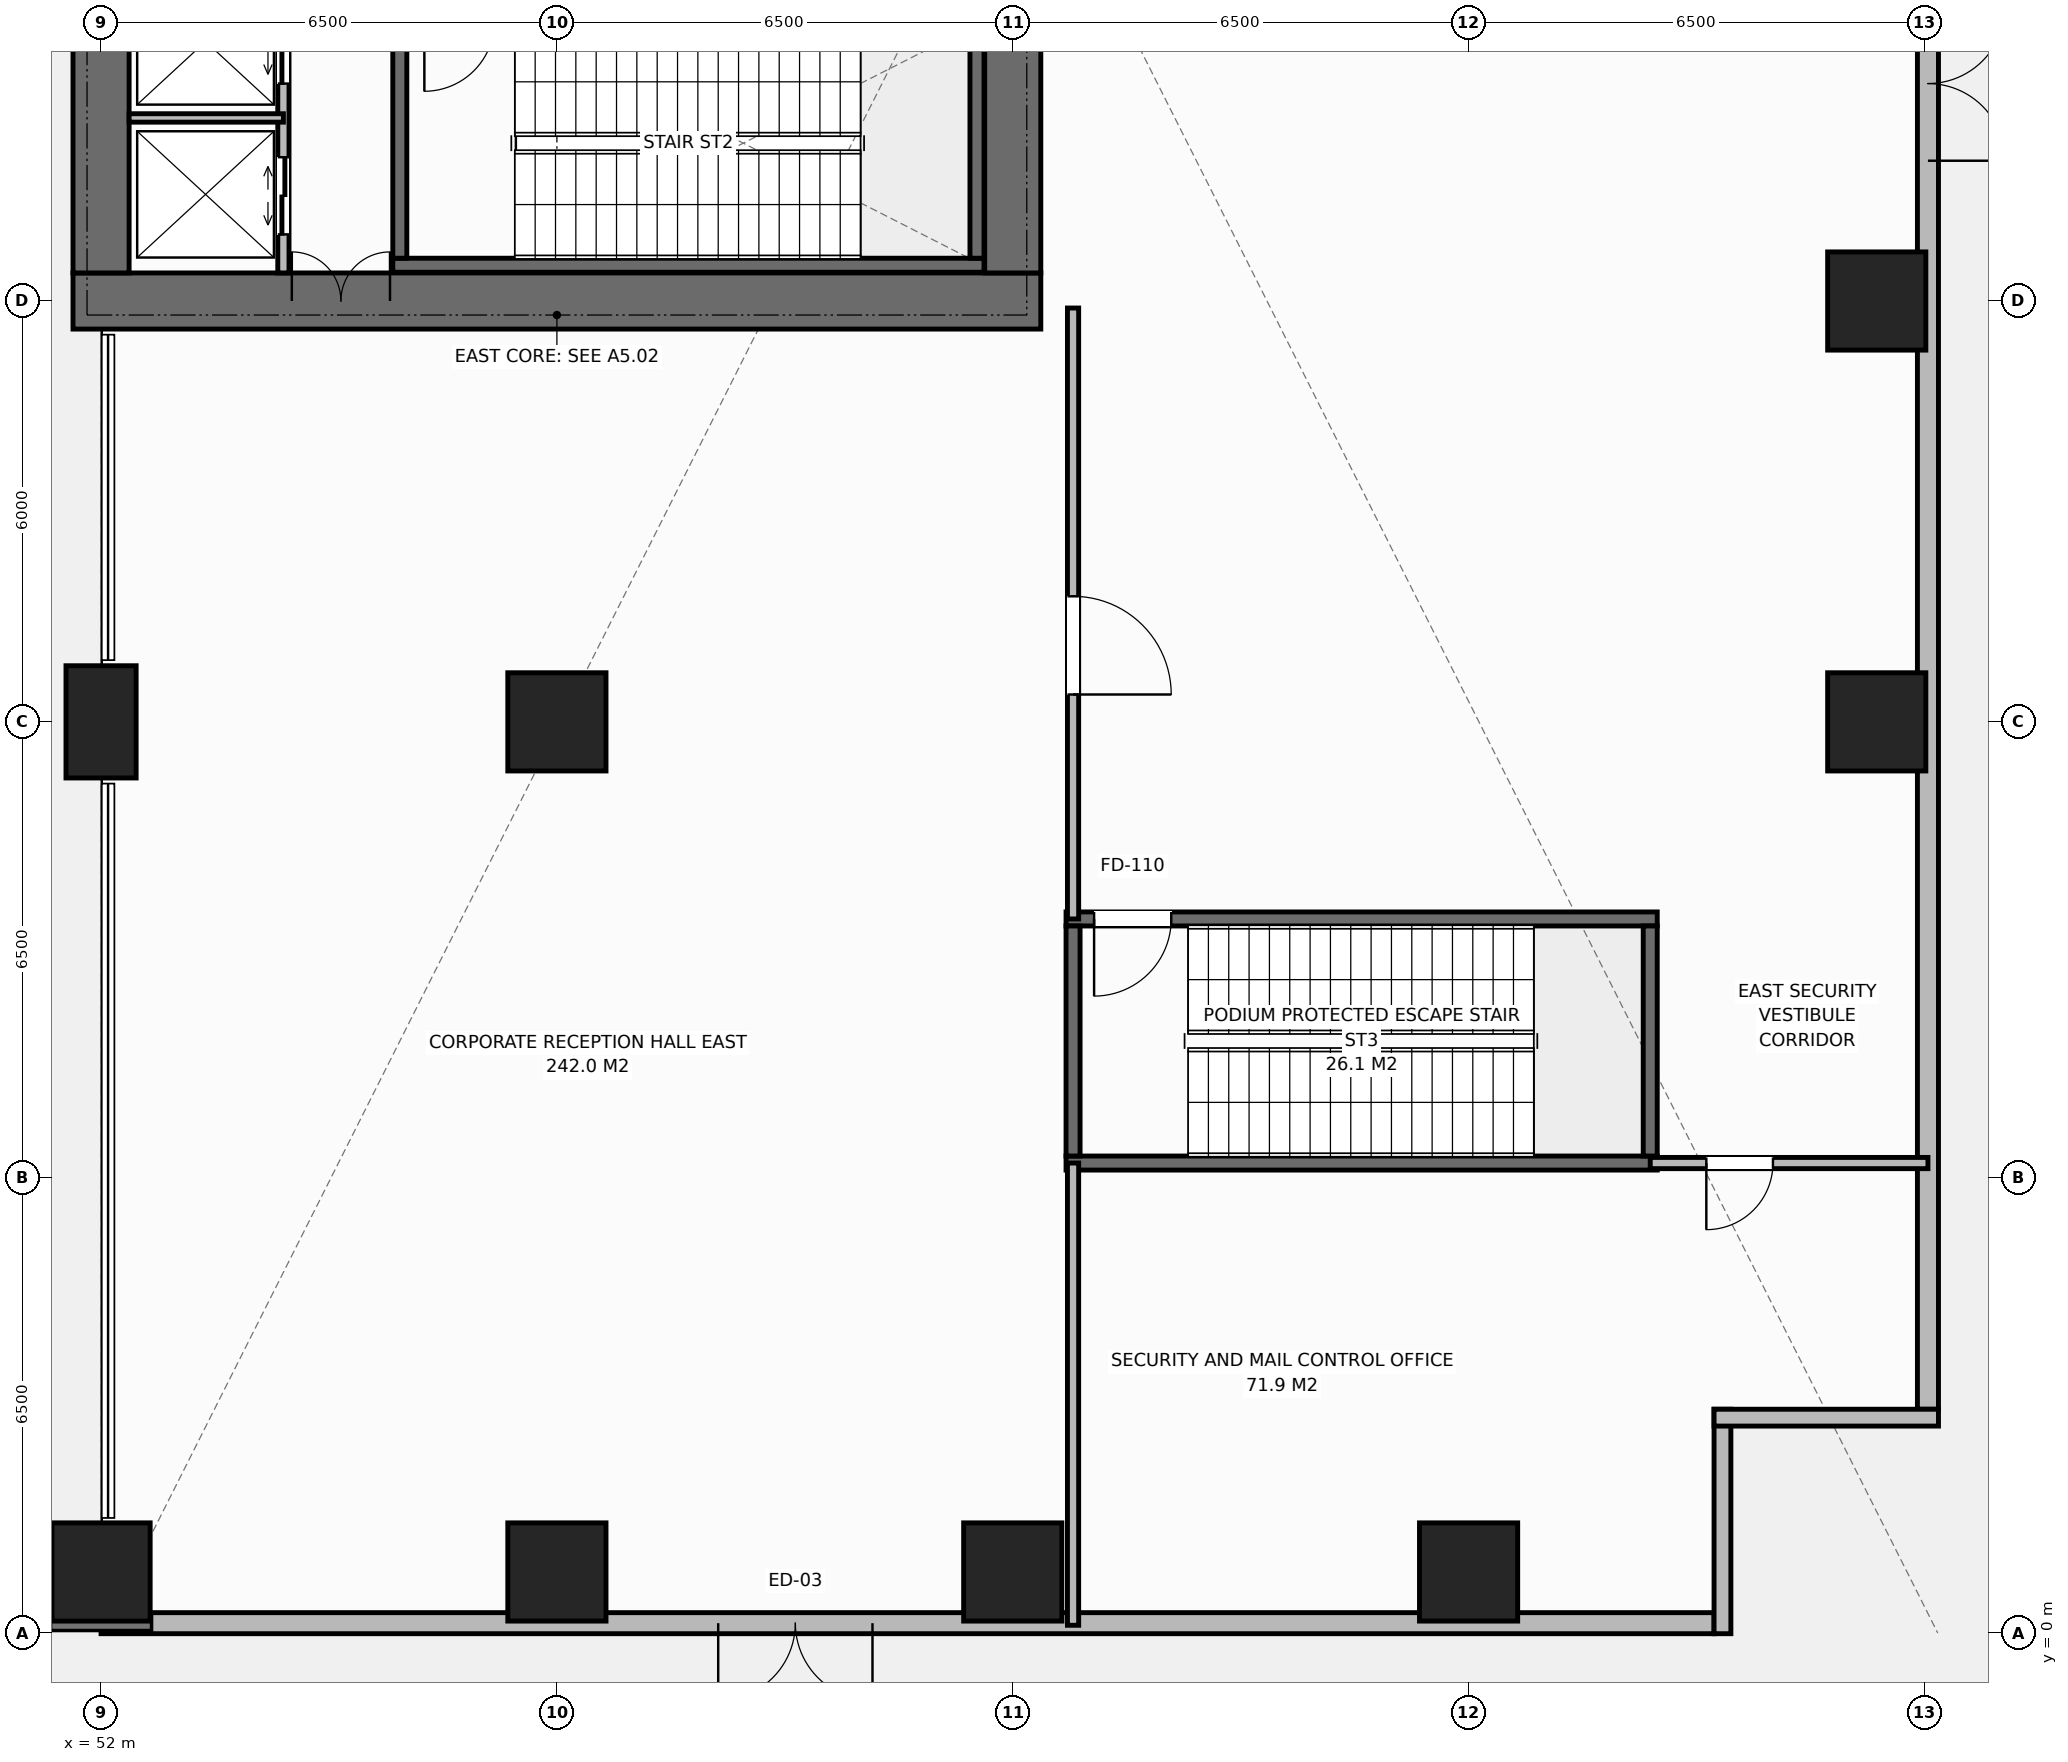
"""IFC4 building model, lengths in metres.
Left out: names, types, materials, properties, quantities, classifications, styles, units other than length and angle.
Written with IfcOpenShell. Run it as: python <this file> out.ifc"""

import sys

from ifc_helpers import new_model, si_unit, direction, frame, frame_2d, origin, origin_2d, place, context, subcontext, project, spatial, rectangle, extrude, element, fill, save


model = new_model("IFC4")
c1 = context("Model", 3, precision=1e-05, world=origin(), true_north=direction((0.0, 1.0)))
c2 = subcontext(c1, "Body", "Model", "MODEL_VIEW")
j1 = project(units=[si_unit("LENGTHUNIT", "METRE"), si_unit("PLANEANGLEUNIT", "RADIAN")], contexts=[c1])
p1 = place(None, origin())
s1 = spatial("IfcSite", under=j1, at=p1, CompositionType="ELEMENT")
p2 = place(p1, origin())
s2 = spatial("IfcBuilding", under=s1, at=p2, CompositionType="ELEMENT")
p3 = place(p2, origin())
s3 = spatial("IfcBuildingStorey", under=s2, at=p3, CompositionType="ELEMENT", Elevation=0.0)
p4 = place(p3, frame((51.6, 19.0, 0.0), z_axis=(0.0, 0.0, 1.0), x_axis=(1.0, 0.0, 0.0)))
e1 = element("IfcWall", 1, at=p4, inside=s3, PredefinedType="SHEAR", context=c2, shape_type="SweptSolid", body=[
    extrude(rectangle(XDim=13.8, YDim=0.8, at=frame_2d((6.9, 0.0))), origin(), (0.0, 0.0, 1.0), 6.0),
])
p5 = place(p4, frame((3.12, 0.0, 0.0)))
e2 = element("IfcOpeningElement", 2, at=p5, cuts=e1, PredefinedType="OPENING", context=c2, shape_type="SweptSolid", body=[
    extrude(rectangle(XDim=1.4, YDim=2.2, at=frame_2d((0.7, 1.1))), frame((0.0, 0.41, 0.0), z_axis=(0.0, -1.0, 0.0), x_axis=(1.0, 0.0, 0.0)), (0.0, 0.0, 1.0), 0.82),
])
p6 = place(p3, frame((52.0, 19.4, 0.0), z_axis=(0.0, 0.0, 1.0), x_axis=(0.0, 1.0, 0.0)))
e3 = element("IfcWall", 3, at=p6, inside=s3, PredefinedType="SHEAR", context=c2, shape_type="SweptSolid", body=[
    extrude(rectangle(XDim=13.2, YDim=0.8, at=frame_2d((6.6, 0.0))), origin(), (0.0, 0.0, 1.0), 6.0),
])
p7 = place(p3, frame((65.0, 19.4, 0.0), z_axis=(0.0, 0.0, 1.0), x_axis=(0.0, 1.0, 0.0)))
e4 = element("IfcWall", 4, at=p7, inside=s3, PredefinedType="SHEAR", context=c2, shape_type="SweptSolid", body=[
    extrude(rectangle(XDim=13.2, YDim=0.8, at=frame_2d((6.6, 0.0))), origin(), (0.0, 0.0, 1.0), 6.0),
])
p8 = place(p7, frame((8.05, 0.0, 0.0)))
e5 = element("IfcOpeningElement", 5, at=p8, cuts=e4, PredefinedType="OPENING", context=c2, shape_type="SweptSolid", body=[
    extrude(rectangle(XDim=1.3, YDim=2.2, at=frame_2d((0.65, 1.1))), frame((0.0, 0.41, 0.0), z_axis=(0.0, -1.0, 0.0), x_axis=(1.0, 0.0, 0.0)), (0.0, 0.0, 1.0), 0.82),
])
p9 = place(p3, frame((56.16, 19.51, 0.0), z_axis=(0.0, 0.0, 1.0), x_axis=(1.0, 0.0, 0.0)))
e6 = element("IfcWall", 6, at=p9, inside=s3, PredefinedType="SHEAR", context=c2, shape_type="SweptSolid", body=[
    extrude(rectangle(XDim=8.43, YDim=0.2, at=frame_2d((4.215, 0.0))), origin(), (0.0, 0.0, 1.0), 6.0),
])
for number, where, z_axis, x_axis in (
    (7, (56.26, 19.61, 0.0), (0.0, 0.0, 1.0), (0.0, 1.0, 0.0)),
    (8, (64.49, 19.61, 0.0), (0.0, 0.0, 1.0), (0.0, 1.0, 0.0)),
):
    element("IfcWall", number, at=place(p3, frame(where, z_axis=z_axis, x_axis=x_axis)), inside=s3, PredefinedType="SHEAR", context=c2, shape_type="SweptSolid", body=[
        extrude(rectangle(XDim=3.28, YDim=0.2, at=frame_2d((1.64, 0.0))), origin(), (0.0, 0.0, 1.0), 6.0),
    ])
p10 = place(p3, frame((65.76, 6.71, 0.0), z_axis=(0.0, 0.0, 1.0), x_axis=(1.0, 0.0, 0.0)))
e9 = element("IfcWall", 9, at=p10, inside=s3, PredefinedType="SHEAR", context=c2, shape_type="SweptSolid", body=[
    extrude(rectangle(XDim=8.43, YDim=0.2, at=frame_2d((4.215, 0.0))), origin(), (0.0, 0.0, 1.0), 6.0),
])
p11 = place(p3, frame((65.76, 10.19, 0.0), z_axis=(0.0, 0.0, 1.0), x_axis=(1.0, 0.0, 0.0)))
e10 = element("IfcWall", 10, at=p11, inside=s3, PredefinedType="SHEAR", context=c2, shape_type="SweptSolid", body=[
    extrude(rectangle(XDim=8.43, YDim=0.2, at=frame_2d((4.215, 0.0))), origin(), (0.0, 0.0, 1.0), 6.0),
])
p12 = place(p11, frame((0.4, 0.0, 0.0)))
e11 = element("IfcOpeningElement", 11, at=p12, cuts=e10, PredefinedType="OPENING", context=c2, shape_type="SweptSolid", body=[
    extrude(rectangle(XDim=1.1, YDim=2.15, at=frame_2d((0.55, 1.075))), frame((0.0, 0.11, 0.0), z_axis=(0.0, -1.0, 0.0), x_axis=(1.0, 0.0, 0.0)), (0.0, 0.0, 1.0), 0.22),
])
for number, where, z_axis, x_axis in (
    (12, (65.86, 6.81, 0.0), (0.0, 0.0, 1.0), (0.0, 1.0, 0.0)),
    (13, (74.09, 6.81, 0.0), (0.0, 0.0, 1.0), (0.0, 1.0, 0.0)),
):
    element("IfcWall", number, at=place(p3, frame(where, z_axis=z_axis, x_axis=x_axis)), inside=s3, PredefinedType="SHEAR", context=c2, shape_type="SweptSolid", body=[
        extrude(rectangle(XDim=3.28, YDim=0.2, at=frame_2d((1.64, 0.0))), origin(), (0.0, 0.0, 1.0), 6.0),
    ])
p13 = place(p3, frame((58.5, 13.0, 0.0), z_axis=(0.0, 0.0, 1.0), x_axis=(1.0, 0.0, 0.0)))
e14 = element("IfcColumn", 14, at=p13, inside=s3, PredefinedType="COLUMN", context=c2, shape_type="SweptSolid", body=[
    extrude(rectangle(XDim=1.4, YDim=1.4, at=origin_2d()), origin(), (0.0, 0.0, 1.0), 6.0),
])
p14 = place(p3, frame((52.0, 13.0, 0.0), z_axis=(0.0, 0.0, 1.0), x_axis=(1.0, 0.0, 0.0)))
e15 = element("IfcColumn", 15, at=p14, inside=s3, PredefinedType="PILASTER", context=c2, shape_type="SweptSolid", body=[
    extrude(rectangle(XDim=1.0, YDim=1.6, at=origin_2d()), origin(), (0.0, 0.0, 1.0), 6.0),
])
for number, where, z_axis, x_axis in (
    (16, (52.0, 0.88, 0.0), (0.0, 0.0, 1.0), (1.0, 0.0, 0.0)),
    (17, (58.5, 0.88, 0.0), (0.0, 0.0, 1.0), (1.0, 0.0, 0.0)),
    (18, (65.0, 0.88, 0.0), (0.0, 0.0, 1.0), (1.0, 0.0, 0.0)),
    (19, (71.5, 0.88, 0.0), (0.0, 0.0, 1.0), (1.0, 0.0, 0.0)),
    (20, (77.32, 13.0, 0.0), (0.0, 0.0, 1.0), (1.0, 0.0, 0.0)),
    (21, (77.32, 19.0, 0.0), (0.0, 0.0, 1.0), (1.0, 0.0, 0.0)),
):
    element("IfcColumn", number, at=place(p3, frame(where, z_axis=z_axis, x_axis=x_axis)), inside=s3, PredefinedType="COLUMN", context=c2, shape_type="SweptSolid", body=[
        extrude(rectangle(XDim=1.4, YDim=1.4, at=origin_2d()), origin(), (0.0, 0.0, 1.0), 6.0),
    ])
p15 = place(p3, frame((75.0, 0.15, 0.0), z_axis=(0.0, 0.0, 1.0), x_axis=(-1.0, 0.0, 0.0)))
e22 = element("IfcWall", 22, at=p15, inside=s3, PredefinedType="STANDARD", context=c2, shape_type="SweptSolid", body=[
    extrude(rectangle(XDim=23.0, YDim=0.3, at=frame_2d((11.5, 0.0))), origin(), (0.0, 0.0, 1.0), 5.72),
])
p16 = place(p15, frame((12.0, 0.0, 0.0)))
e23 = element("IfcOpeningElement", 23, at=p16, cuts=e22, PredefinedType="OPENING", context=c2, shape_type="SweptSolid", body=[
    extrude(rectangle(XDim=2.2, YDim=2.4, at=frame_2d((1.1, 1.2))), frame((0.0, 0.16, 0.0), z_axis=(0.0, -1.0, 0.0), x_axis=(1.0, 0.0, 0.0)), (0.0, 0.0, 1.0), 0.32),
])
p17 = place(p3, frame((78.05, 48.8, 0.0), z_axis=(0.0, 0.0, 1.0), x_axis=(0.0, -1.0, 0.0)))
e24 = element("IfcWall", 24, at=p17, inside=s3, PredefinedType="STANDARD", context=c2, shape_type="SweptSolid", body=[
    extrude(rectangle(XDim=45.6, YDim=0.3, at=frame_2d((22.8, 0.0))), origin(), (0.0, 0.0, 1.0), 5.72),
])
p18 = place(p17, frame((2.6, 0.0, 0.0)))
e25 = element("IfcOpeningElement", 25, at=p18, cuts=e24, PredefinedType="OPENING", context=c2, shape_type="SweptSolid", body=[
    extrude(rectangle(XDim=6.0, YDim=3.2, at=frame_2d((3.0, 1.6))), frame((0.0, 0.16, 0.0), z_axis=(0.0, -1.0, 0.0), x_axis=(1.0, 0.0, 0.0)), (0.0, 0.0, 1.0), 0.32),
])
p19 = place(p17, frame((25.6, 0.0, 0.0)))
e26 = element("IfcOpeningElement", 26, at=p19, cuts=e24, PredefinedType="OPENING", context=c2, shape_type="SweptSolid", body=[
    extrude(rectangle(XDim=2.2, YDim=2.4, at=frame_2d((1.1, 1.2))), frame((0.0, 0.16, 0.0), z_axis=(0.0, -1.0, 0.0), x_axis=(1.0, 0.0, 0.0)), (0.0, 0.0, 1.0), 0.32),
])
for number, where, z_axis, x_axis in (
    (27, (75.12, 3.2, 0.0), (0.0, 0.0, 1.0), (0.0, -1.0, 0.0)),
    (28, (78.2, 3.08, 0.0), (0.0, 0.0, 1.0), (-1.0, 0.0, 0.0)),
):
    element("IfcWall", number, at=place(p3, frame(where, z_axis=z_axis, x_axis=x_axis)), inside=s3, PredefinedType="STANDARD", context=c2, shape_type="SweptSolid", body=[
        extrude(rectangle(XDim=3.2, YDim=0.24, at=frame_2d((1.6, 0.0))), origin(), (0.0, 0.0, 1.0), 5.72),
    ])
p20 = place(p3, frame((54.6, 19.4, 0.0), z_axis=(0.0, 0.0, 1.0), x_axis=(0.0, 1.0, 0.0)))
e29 = element("IfcWall", 29, at=p20, inside=s3, PredefinedType="STANDARD", context=c2, shape_type="SweptSolid", body=[
    extrude(rectangle(XDim=13.2, YDim=0.16, at=frame_2d((6.6, 0.0))), origin(), (0.0, 0.0, 1.0), 5.72),
])
p21 = place(p20, frame((0.55, 0.0, 0.0)))
e30 = element("IfcOpeningElement", 30, at=p21, cuts=e29, PredefinedType="OPENING", context=c2, shape_type="SweptSolid", body=[
    extrude(rectangle(XDim=1.1, YDim=2.2, at=frame_2d((0.55, 1.1))), frame((0.0, 0.09, 0.0), z_axis=(0.0, -1.0, 0.0), x_axis=(1.0, 0.0, 0.0)), (0.0, 0.0, 1.0), 0.18),
])
p22 = place(p20, frame((2.7, 0.0, 0.0)))
e31 = element("IfcOpeningElement", 31, at=p22, cuts=e29, PredefinedType="OPENING", context=c2, shape_type="SweptSolid", body=[
    extrude(rectangle(XDim=1.1, YDim=2.2, at=frame_2d((0.55, 1.1))), frame((0.0, 0.09, 0.0), z_axis=(0.0, -1.0, 0.0), x_axis=(1.0, 0.0, 0.0)), (0.0, 0.0, 1.0), 0.18),
])
p23 = place(p20, frame((4.9, 0.0, 0.0)))
e32 = element("IfcOpeningElement", 32, at=p23, cuts=e29, PredefinedType="OPENING", context=c2, shape_type="SweptSolid", body=[
    extrude(rectangle(XDim=1.1, YDim=2.2, at=frame_2d((0.55, 1.1))), frame((0.0, 0.09, 0.0), z_axis=(0.0, -1.0, 0.0), x_axis=(1.0, 0.0, 0.0)), (0.0, 0.0, 1.0), 0.18),
])
p24 = place(p20, frame((7.05, 0.0, 0.0)))
e33 = element("IfcOpeningElement", 33, at=p24, cuts=e29, PredefinedType="OPENING", context=c2, shape_type="SweptSolid", body=[
    extrude(rectangle(XDim=1.1, YDim=2.2, at=frame_2d((0.55, 1.1))), frame((0.0, 0.09, 0.0), z_axis=(0.0, -1.0, 0.0), x_axis=(1.0, 0.0, 0.0)), (0.0, 0.0, 1.0), 0.18),
])
p25 = place(p20, frame((9.2, 0.0, 0.0)))
e34 = element("IfcOpeningElement", 34, at=p25, cuts=e29, PredefinedType="OPENING", context=c2, shape_type="SweptSolid", body=[
    extrude(rectangle(XDim=1.1, YDim=2.2, at=frame_2d((0.55, 1.1))), frame((0.0, 0.09, 0.0), z_axis=(0.0, -1.0, 0.0), x_axis=(1.0, 0.0, 0.0)), (0.0, 0.0, 1.0), 0.18),
])
p26 = place(p20, frame((11.4, 0.0, 0.0)))
e35 = element("IfcOpeningElement", 35, at=p26, cuts=e29, PredefinedType="OPENING", context=c2, shape_type="SweptSolid", body=[
    extrude(rectangle(XDim=1.1, YDim=2.2, at=frame_2d((0.55, 1.1))), frame((0.0, 0.09, 0.0), z_axis=(0.0, -1.0, 0.0), x_axis=(1.0, 0.0, 0.0)), (0.0, 0.0, 1.0), 0.18),
])
p27 = place(p3, frame((52.4, 21.61, 0.0), z_axis=(0.0, 0.0, 1.0), x_axis=(1.0, 0.0, 0.0)))
e36 = element("IfcWall", 36, at=p27, inside=s3, PredefinedType="PARTITIONING", context=c2, shape_type="SweptSolid", body=[
    extrude(rectangle(XDim=2.2, YDim=0.12, at=frame_2d((1.1, 0.0))), origin(), (0.0, 0.0, 1.0), 5.72),
])
p28 = place(p3, frame((65.86, 0.12, 0.0), z_axis=(0.0, 0.0, 1.0), x_axis=(0.0, 1.0, 0.0)))
e37 = element("IfcWall", 37, at=p28, inside=s3, PredefinedType="STANDARD", context=c2, shape_type="SweptSolid", body=[
    extrude(rectangle(XDim=6.59, YDim=0.16, at=frame_2d((3.295, 0.0))), origin(), (0.0, 0.0, 1.0), 5.72),
])
p29 = place(p3, frame((74.09, 6.71, 0.0), z_axis=(0.0, 0.0, 1.0), x_axis=(1.0, 0.0, 0.0)))
e38 = element("IfcWall", 38, at=p29, inside=s3, PredefinedType="STANDARD", context=c2, shape_type="SweptSolid", body=[
    extrude(rectangle(XDim=3.96, YDim=0.16, at=frame_2d((1.98, 0.0))), origin(), (0.0, 0.0, 1.0), 5.72),
])
p30 = place(p29, frame((0.8, 0.0, 0.0)))
e39 = element("IfcOpeningElement", 39, at=p30, cuts=e38, PredefinedType="OPENING", context=c2, shape_type="SweptSolid", body=[
    extrude(rectangle(XDim=0.95, YDim=2.15, at=frame_2d((0.475, 1.075))), frame((0.0, 0.09, 0.0), z_axis=(0.0, -1.0, 0.0), x_axis=(1.0, 0.0, 0.0)), (0.0, 0.0, 1.0), 0.18),
])
p31 = place(p3, frame((65.86, 10.19, 0.0), z_axis=(0.0, 0.0, 1.0), x_axis=(0.0, 1.0, 0.0)))
e40 = element("IfcWall", 40, at=p31, inside=s3, PredefinedType="STANDARD", context=c2, shape_type="SweptSolid", body=[
    extrude(rectangle(XDim=8.71, YDim=0.16, at=frame_2d((4.355, 0.0))), origin(), (0.0, 0.0, 1.0), 5.72),
])
p32 = place(p31, frame((3.2, 0.0, 0.0)))
e41 = element("IfcOpeningElement", 41, at=p32, cuts=e40, PredefinedType="OPENING", context=c2, shape_type="SweptSolid", body=[
    extrude(rectangle(XDim=1.4, YDim=2.2, at=frame_2d((0.7, 1.1))), frame((0.0, 0.09, 0.0), z_axis=(0.0, -1.0, 0.0), x_axis=(1.0, 0.0, 0.0)), (0.0, 0.0, 1.0), 0.18),
])
p33 = place(p16, origin())
e42 = element("IfcDoor", 42, at=p33, inside=s3, OperationType="DOUBLE_DOOR_SINGLE_SWING", PredefinedType="DOOR", context=c2, shape_type="SweptSolid", body=[
    extrude(rectangle(XDim=2.2, YDim=2.4, at=frame_2d((1.1, 1.2))), frame((0.0, 0.025, 0.0), z_axis=(0.0, -1.0, 0.0), x_axis=(1.0, 0.0, 0.0)), (0.0, 0.0, 1.0), 0.05),
])
fill(e23, e42)
p34 = place(p19, origin())
e43 = element("IfcDoor", 43, at=p34, inside=s3, OperationType="DOUBLE_DOOR_SINGLE_SWING", PredefinedType="DOOR", context=c2, shape_type="SweptSolid", body=[
    extrude(rectangle(XDim=2.2, YDim=2.4, at=frame_2d((1.1, 1.2))), frame((0.0, 0.025, 0.0), z_axis=(0.0, -1.0, 0.0), x_axis=(1.0, 0.0, 0.0)), (0.0, 0.0, 1.0), 0.05),
])
fill(e26, e43)
p35 = place(p5, origin())
e44 = element("IfcDoor", 44, at=p35, inside=s3, OperationType="DOUBLE_DOOR_SINGLE_SWING", PredefinedType="DOOR", context=c2, shape_type="SweptSolid", body=[
    extrude(rectangle(XDim=1.4, YDim=2.2, at=frame_2d((0.7, 1.1))), frame((0.0, 0.125, 0.0), z_axis=(0.0, -1.0, 0.0), x_axis=(1.0, 0.0, 0.0)), (0.0, 0.0, 1.0), 0.05),
])
fill(e2, e44)
p36 = place(p21, origin())
e45 = element("IfcDoor", 45, at=p36, inside=s3, OperationType="DOUBLE_DOOR_SLIDING", PredefinedType="DOOR", context=c2, shape_type="SweptSolid", body=[
    extrude(rectangle(XDim=1.1, YDim=2.2, at=frame_2d((0.55, 1.1))), frame((0.0, 0.025, 0.0), z_axis=(0.0, -1.0, 0.0), x_axis=(1.0, 0.0, 0.0)), (0.0, 0.0, 1.0), 0.05),
])
fill(e30, e45)
p37 = place(p22, origin())
e46 = element("IfcDoor", 46, at=p37, inside=s3, OperationType="DOUBLE_DOOR_SLIDING", PredefinedType="DOOR", context=c2, shape_type="SweptSolid", body=[
    extrude(rectangle(XDim=1.1, YDim=2.2, at=frame_2d((0.55, 1.1))), frame((0.0, 0.025, 0.0), z_axis=(0.0, -1.0, 0.0), x_axis=(1.0, 0.0, 0.0)), (0.0, 0.0, 1.0), 0.05),
])
fill(e31, e46)
p38 = place(p12, origin())
e47 = element("IfcDoor", 47, at=p38, inside=s3, OperationType="SINGLE_SWING_RIGHT", PredefinedType="DOOR", context=c2, shape_type="SweptSolid", body=[
    extrude(rectangle(XDim=1.1, YDim=2.15, at=frame_2d((0.55, 1.075))), frame((0.0, 0.025, 0.0), z_axis=(0.0, -1.0, 0.0), x_axis=(1.0, 0.0, 0.0)), (0.0, 0.0, 1.0), 0.05),
])
fill(e11, e47)
p39 = place(p30, origin())
e48 = element("IfcDoor", 48, at=p39, inside=s3, OperationType="SINGLE_SWING_RIGHT", PredefinedType="DOOR", context=c2, shape_type="SweptSolid", body=[
    extrude(rectangle(XDim=0.95, YDim=2.15, at=frame_2d((0.475, 1.075))), frame((0.0, 0.025, 0.0), z_axis=(0.0, -1.0, 0.0), x_axis=(1.0, 0.0, 0.0)), (0.0, 0.0, 1.0), 0.05),
])
fill(e39, e48)
p40 = place(p32, origin())
e49 = element("IfcDoor", 49, at=p40, inside=s3, OperationType="SINGLE_SWING_RIGHT", PredefinedType="DOOR", context=c2, shape_type="SweptSolid", body=[
    extrude(rectangle(XDim=1.4, YDim=2.2, at=frame_2d((0.7, 1.1))), frame((0.0, 0.025, 0.0), z_axis=(0.0, -1.0, 0.0), x_axis=(1.0, 0.0, 0.0)), (0.0, 0.0, 1.0), 0.05),
])
fill(e41, e49)
save(model, sys.argv[1])
